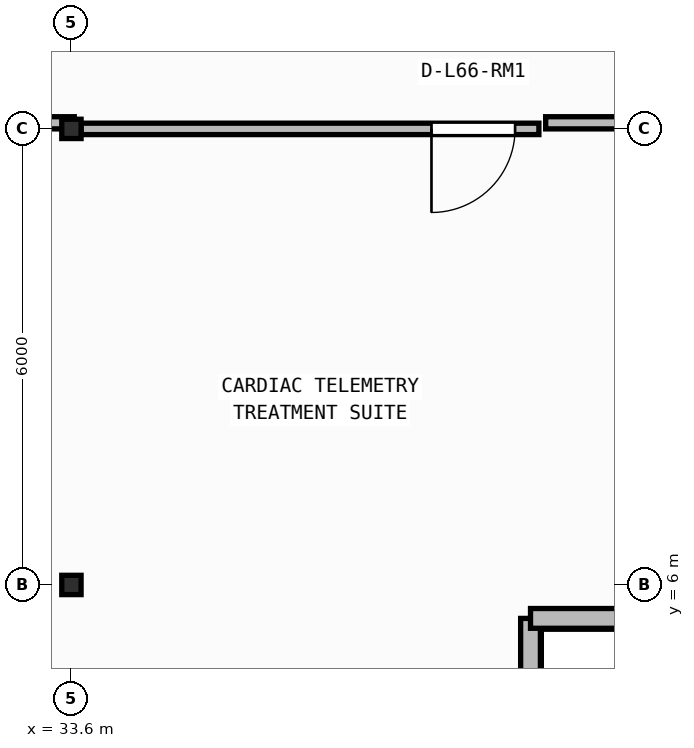
"""IFC4 building model, lengths in metres.
Left out: names, types, materials, properties, quantities, classifications, styles, units other than length and angle.
Written with IfcOpenShell. Run it as: python <this file> out.ifc"""

import sys

from ifc_helpers import new_model, si_unit, direction, frame, frame_2d, origin, origin_2d, place, context, subcontext, project, spatial, rectangle, i_section, extrude, element, fill, save


model = new_model("IFC4")
c1 = context("Model", 3, precision=1e-05, world=origin(), true_north=direction((0.0, 1.0)))
c2 = subcontext(c1, "Body", "Model", "MODEL_VIEW")
j1 = project(units=[si_unit("LENGTHUNIT", "METRE"), si_unit("PLANEANGLEUNIT", "RADIAN")], contexts=[c1])
p1 = place(None, origin())
s1 = spatial("IfcSite", under=j1, at=p1, CompositionType="ELEMENT")
p2 = place(p1, origin())
s2 = spatial("IfcBuilding", under=s1, at=p2, CompositionType="ELEMENT")
p3 = place(p2, frame((0.0, 0.0, 268.4)))
s3 = spatial("IfcBuildingStorey", under=s2, at=p3, CompositionType="ELEMENT", Elevation=268.4)
for number, where, z_axis, x_axis in (
    (1, (33.6, 6.0, 0.0), (0.0, 0.0, 1.0), (1.0, 0.0, 0.0)),
    (2, (33.6, 12.0, 0.0), (0.0, 0.0, 1.0), (1.0, 0.0, 0.0)),
):
    element("IfcColumn", number, at=place(p3, frame(where, z_axis=z_axis, x_axis=x_axis)), inside=s3, PredefinedType="COLUMN", context=c2, shape_type="SweptSolid", body=[
        extrude(i_section(OverallWidth=0.254, OverallDepth=0.254, WebThickness=0.009, FlangeThickness=0.014, FilletRadius=0.013, at=origin_2d()), origin(), (0.0, 0.0, 1.0), 3.95),
    ])
p4 = place(p3, frame((39.64, 3.148, 0.0), z_axis=(0.0, 0.0, 1.0), x_axis=(0.0, 1.0, 0.0)))
e3 = element("IfcWall", 3, at=p4, inside=s3, PredefinedType="STANDARD", context=c2, shape_type="SweptSolid", body=[
    extrude(rectangle(XDim=2.412, YDim=0.26, at=frame_2d((1.206, 0.0))), origin(), (0.0, 0.0, 1.0), 3.71),
])
p5 = place(p3, frame((39.64, 5.56, 0.0), z_axis=(0.0, 0.0, 1.0), x_axis=(1.0, 0.0, 0.0)))
e4 = element("IfcWall", 4, at=p5, inside=s3, PredefinedType="STANDARD", context=c2, shape_type="SweptSolid", body=[
    extrude(rectangle(XDim=2.4, YDim=0.26, at=frame_2d((1.2, 0.0))), origin(), (0.0, 0.0, 1.0), 3.71),
])
p6 = place(p3, frame((39.75, 12.0, 0.0), z_axis=(0.0, 0.0, 1.0), x_axis=(-1.0, 0.0, 0.0)))
e5 = element("IfcWall", 5, at=p6, inside=s3, PredefinedType="PARTITIONING", context=c2, shape_type="SweptSolid", body=[
    extrude(rectangle(XDim=6.023, YDim=0.15, at=frame_2d((3.011, 0.0))), origin(), (0.0, 0.0, 1.0), 3.71),
])
p7 = place(p6, frame((0.313, 0.0, 0.0)))
e6 = element("IfcOpeningElement", 6, at=p7, cuts=e5, PredefinedType="OPENING", context=c2, shape_type="SweptSolid", body=[
    extrude(rectangle(XDim=1.1, YDim=2.1, at=frame_2d((0.55, 1.05))), frame((0.0, 0.085, 0.0), z_axis=(0.0, -1.0, 0.0), x_axis=(1.0, 0.0, 0.0)), (0.0, 0.0, 1.0), 0.17),
])
p8 = place(p3, frame((31.439, 12.08, 0.0), z_axis=(0.0, 0.0, 1.0), x_axis=(1.0, 0.0, 0.0)))
e7 = element("IfcWall", 7, at=p8, inside=s3, PredefinedType="PARTITIONING", context=c2, shape_type="SweptSolid", body=[
    extrude(rectangle(XDim=2.198, YDim=0.16, at=frame_2d((1.099, 0.0))), origin(), (0.0, 0.0, 1.0), 3.157),
])
p9 = place(p3, frame((39.839, 12.08, 0.0), z_axis=(0.0, 0.0, 1.0), x_axis=(1.0, 0.0, 0.0)))
e8 = element("IfcWall", 8, at=p9, inside=s3, PredefinedType="PARTITIONING", context=c2, shape_type="SweptSolid", body=[
    extrude(rectangle(XDim=2.061, YDim=0.16, at=frame_2d((1.03, 0.0))), origin(), (0.0, 0.0, 1.0), 3.71),
])
p10 = place(p7, origin())
e9 = element("IfcDoor", 9, at=p10, inside=s3, OperationType="SINGLE_SWING_RIGHT", PredefinedType="DOOR", context=c2, shape_type="SweptSolid", body=[
    extrude(rectangle(XDim=1.1, YDim=2.1, at=frame_2d((0.55, 1.05))), frame((0.0, 0.025, 0.0), z_axis=(0.0, -1.0, 0.0), x_axis=(1.0, 0.0, 0.0)), (0.0, 0.0, 1.0), 0.05),
])
fill(e6, e9)
save(model, sys.argv[1])
